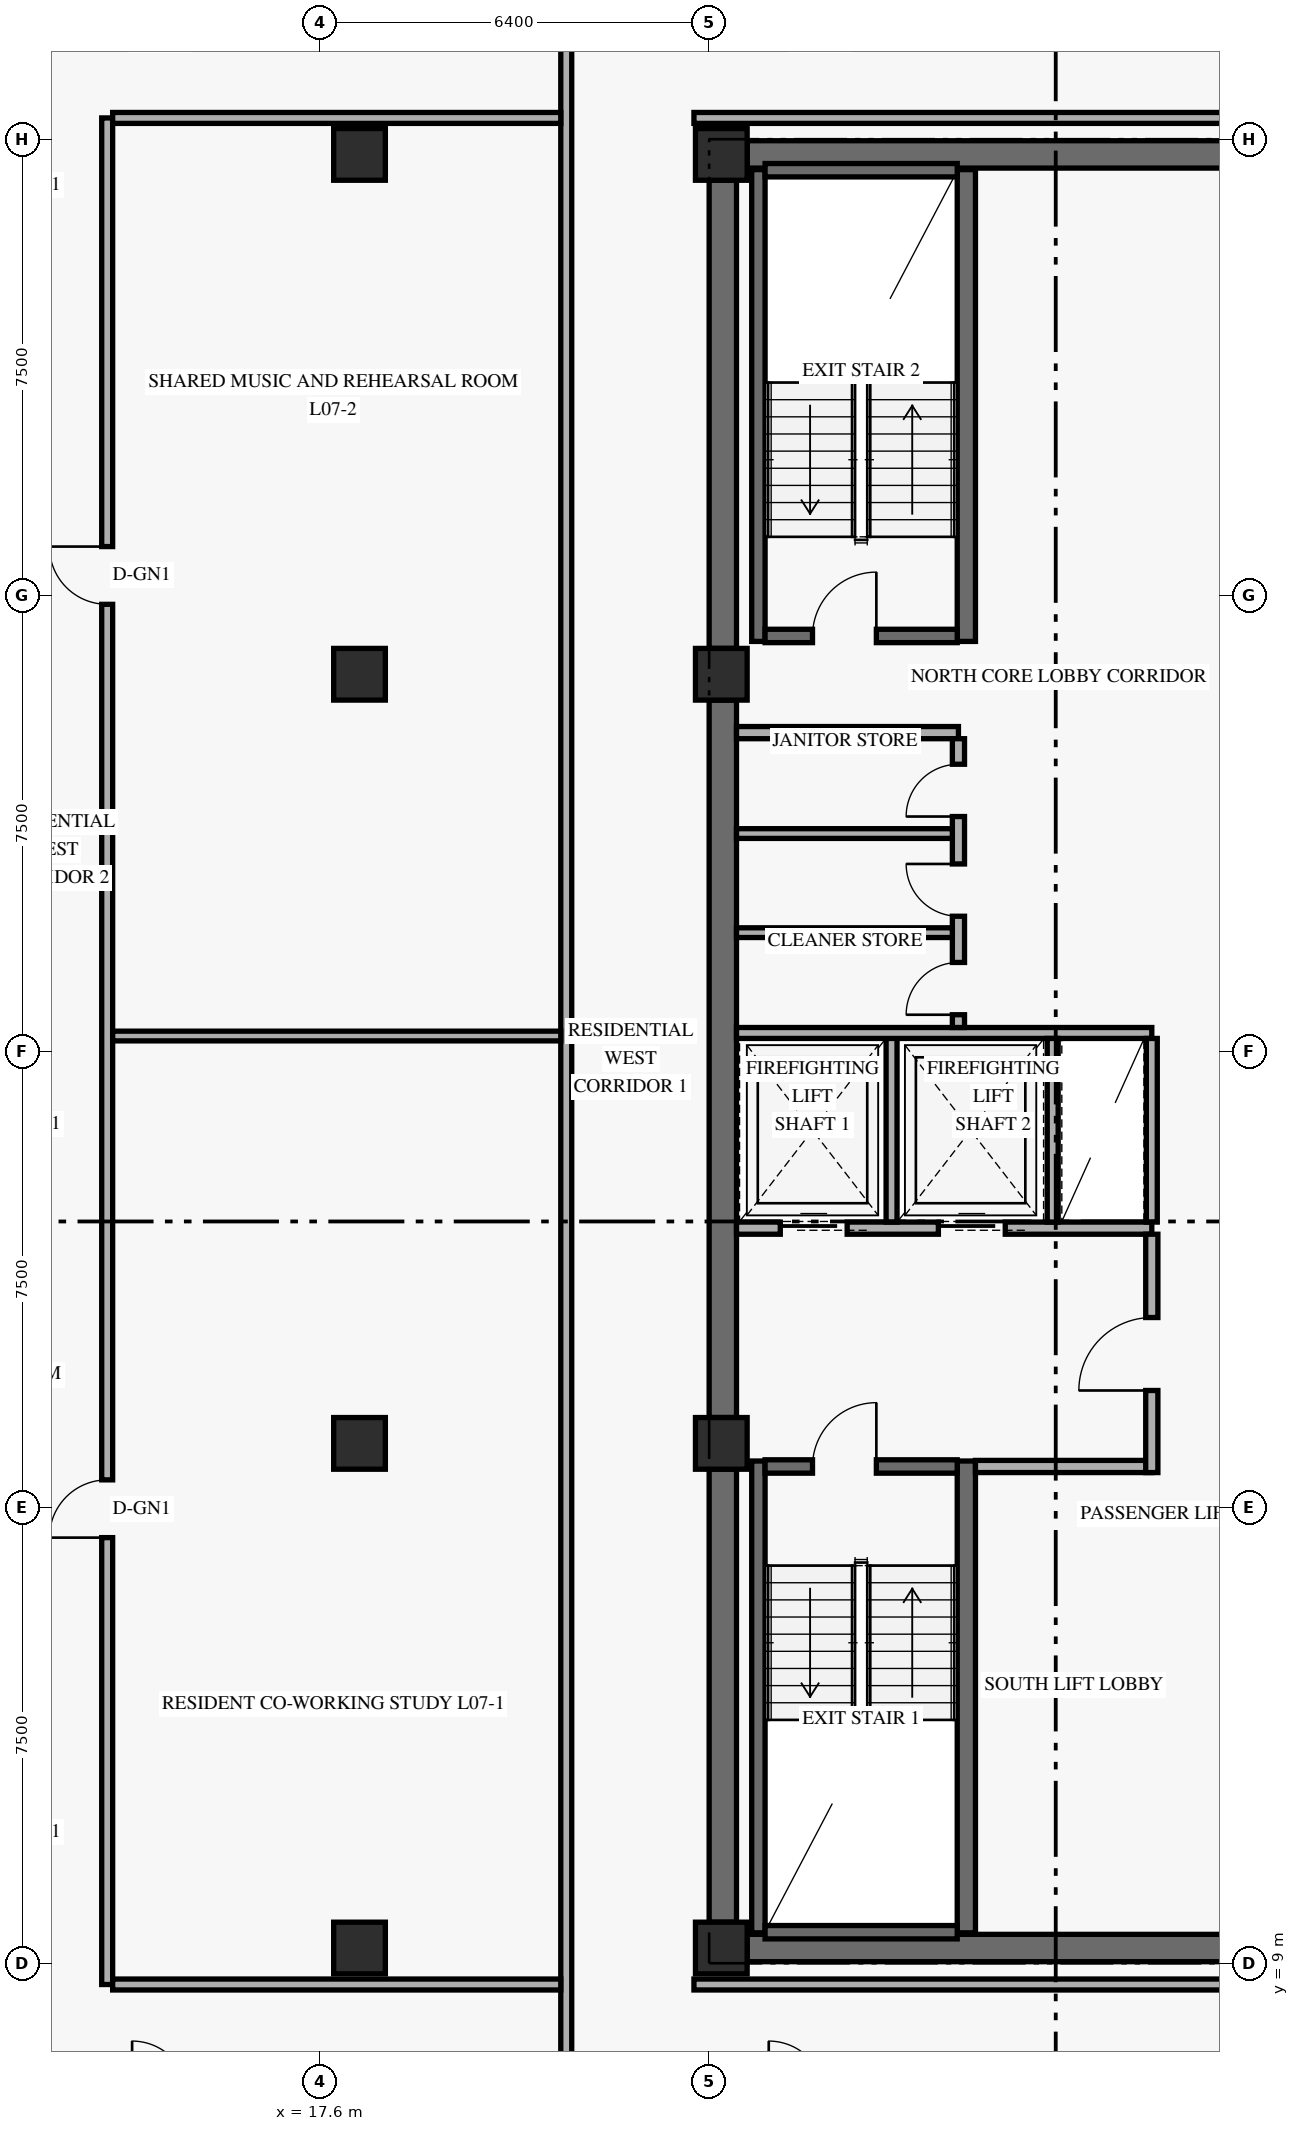
"""IFC4 building model, lengths in metres.
Left out: names, types, materials, properties, quantities, classifications, styles, units other than length and angle.
Written with IfcOpenShell. Run it as: python <this file> out.ifc"""

import sys

from ifc_helpers import new_model, si_unit, direction, frame, frame_2d, origin, origin_2d, place, context, subcontext, project, spatial, rectangle, extrude, element, fill, save


model = new_model("IFC4")
c1 = context("Model", 3, precision=1e-05, world=origin(), true_north=direction((0.0, 1.0)))
c2 = subcontext(c1, "Body", "Model", "MODEL_VIEW")
j1 = project(units=[si_unit("LENGTHUNIT", "METRE"), si_unit("PLANEANGLEUNIT", "RADIAN")], contexts=[c1])
p1 = place(None, origin())
s1 = spatial("IfcSite", under=j1, at=p1, CompositionType="ELEMENT")
p2 = place(p1, origin())
s2 = spatial("IfcBuilding", under=s1, at=p2, CompositionType="ELEMENT")
p3 = place(p2, frame((0.0, 0.0, 31.2)))
s3 = spatial("IfcBuildingStorey", under=s2, at=p3, CompositionType="ELEMENT", Elevation=31.2)
p4 = place(p3, frame((24.225, 9.675, 0.0), z_axis=(0.0, 0.0, 1.0), x_axis=(0.0, 1.0, 0.0)))
e1 = element("IfcWall", 1, at=p4, inside=s3, PredefinedType="SHEAR", context=c2, shape_type="SweptSolid", body=[
    extrude(rectangle(XDim=7.45, YDim=0.45, at=frame_2d((3.725, 0.0))), origin(), (0.0, 0.0, 1.0), 2.667),
])
p5 = place(p3, frame((24.225, 17.975, 0.0), z_axis=(0.0, 0.0, 1.0), x_axis=(0.0, 1.0, 0.0)))
e2 = element("IfcWall", 2, at=p5, inside=s3, PredefinedType="SHEAR", context=c2, shape_type="SweptSolid", body=[
    extrude(rectangle(XDim=11.8, YDim=0.45, at=frame_2d((5.9, 0.0))), origin(), (0.0, 0.0, 1.0), 2.667),
])
p6 = place(p3, frame((24.225, 30.625, 0.0), z_axis=(0.0, 0.0, 1.0), x_axis=(0.0, 1.0, 0.0)))
e3 = element("IfcWall", 3, at=p6, inside=s3, PredefinedType="SHEAR", context=c2, shape_type="SweptSolid", body=[
    extrude(rectangle(XDim=7.7, YDim=0.45, at=frame_2d((3.85, 0.0))), origin(), (0.0, 0.0, 1.0), 2.667),
])
for number, where, z_axis, x_axis in (
    (4, (24.625, 9.25, 0.0), (0.0, 0.0, 1.0), (1.0, 0.0, 0.0)),
    (5, (24.625, 38.75, 0.0), (0.0, 0.0, 1.0), (1.0, 0.0, 0.0)),
):
    element("IfcWall", number, at=place(p3, frame(where, z_axis=z_axis, x_axis=x_axis)), inside=s3, PredefinedType="SHEAR", context=c2, shape_type="SweptSolid", body=[
        extrude(rectangle(XDim=10.15, YDim=0.45, at=frame_2d((5.075, 0.0))), origin(), (0.0, 0.0, 1.0), 3.36),
    ])
p7 = place(p3, frame((24.81, 9.5, 0.0), z_axis=(0.0, 0.0, 1.0), x_axis=(0.0, 1.0, 0.0)))
e6 = element("IfcWall", 6, at=p7, inside=s3, PredefinedType="SHEAR", context=c2, shape_type="SweptSolid", body=[
    extrude(rectangle(XDim=7.76, YDim=0.22, at=frame_2d((3.88, 0.0))), origin(), (0.0, 0.0, 1.0), 3.36),
])
p8 = place(p3, frame((28.23, 9.5, 0.0), z_axis=(0.0, 0.0, 1.0), x_axis=(0.0, 1.0, 0.0)))
e7 = element("IfcWall", 7, at=p8, inside=s3, PredefinedType="SHEAR", context=c2, shape_type="SweptSolid", body=[
    extrude(rectangle(XDim=7.76, YDim=0.3, at=frame_2d((3.88, 0.0))), origin(), (0.0, 0.0, 1.0), 3.36),
])
p9 = place(p3, frame((24.92, 9.51, 0.0), z_axis=(0.0, 0.0, 1.0), x_axis=(1.0, 0.0, 0.0)))
e8 = element("IfcWall", 8, at=p9, inside=s3, PredefinedType="SHEAR", context=c2, shape_type="SweptSolid", body=[
    extrude(rectangle(XDim=3.16, YDim=0.22, at=frame_2d((1.58, 0.0))), origin(), (0.0, 0.0, 1.0), 3.36),
])
p10 = place(p3, frame((24.92, 17.17, 0.0), z_axis=(0.0, 0.0, 1.0), x_axis=(1.0, 0.0, 0.0)))
e9 = element("IfcWall", 9, at=p10, inside=s3, PredefinedType="SHEAR", context=c2, shape_type="SweptSolid", body=[
    extrude(rectangle(XDim=3.16, YDim=0.22, at=frame_2d((1.58, 0.0))), origin(), (0.0, 0.0, 1.0), 3.36),
])
p11 = place(p10, frame((0.78, 0.0, 0.0)))
e10 = element("IfcOpeningElement", 10, at=p11, cuts=e9, PredefinedType="OPENING", context=c2, shape_type="SweptSolid", body=[
    extrude(rectangle(XDim=1.05, YDim=2.15, at=frame_2d((0.525, 1.075))), frame((0.0, 0.12, 0.0), z_axis=(0.0, -1.0, 0.0), x_axis=(1.0, 0.0, 0.0)), (0.0, 0.0, 1.0), 0.24),
])
p12 = place(p3, frame((24.81, 30.74, 0.0), z_axis=(0.0, 0.0, 1.0), x_axis=(0.0, 1.0, 0.0)))
e11 = element("IfcWall", 11, at=p12, inside=s3, PredefinedType="SHEAR", context=c2, shape_type="SweptSolid", body=[
    extrude(rectangle(XDim=7.76, YDim=0.22, at=frame_2d((3.88, 0.0))), origin(), (0.0, 0.0, 1.0), 3.36),
])
p13 = place(p3, frame((28.23, 30.74, 0.0), z_axis=(0.0, 0.0, 1.0), x_axis=(0.0, 1.0, 0.0)))
e12 = element("IfcWall", 12, at=p13, inside=s3, PredefinedType="SHEAR", context=c2, shape_type="SweptSolid", body=[
    extrude(rectangle(XDim=7.76, YDim=0.3, at=frame_2d((3.88, 0.0))), origin(), (0.0, 0.0, 1.0), 3.36),
])
p14 = place(p3, frame((24.92, 30.83, 0.0), z_axis=(0.0, 0.0, 1.0), x_axis=(1.0, 0.0, 0.0)))
e13 = element("IfcWall", 13, at=p14, inside=s3, PredefinedType="SHEAR", context=c2, shape_type="SweptSolid", body=[
    extrude(rectangle(XDim=3.16, YDim=0.22, at=frame_2d((1.58, 0.0))), origin(), (0.0, 0.0, 1.0), 3.36),
])
p15 = place(p14, frame((0.78, 0.0, 0.0)))
e14 = element("IfcOpeningElement", 14, at=p15, cuts=e13, PredefinedType="OPENING", context=c2, shape_type="SweptSolid", body=[
    extrude(rectangle(XDim=1.05, YDim=2.15, at=frame_2d((0.525, 1.075))), frame((0.0, 0.12, 0.0), z_axis=(0.0, -1.0, 0.0), x_axis=(1.0, 0.0, 0.0)), (0.0, 0.0, 1.0), 0.24),
])
p16 = place(p3, frame((24.92, 38.49, 0.0), z_axis=(0.0, 0.0, 1.0), x_axis=(1.0, 0.0, 0.0)))
e15 = element("IfcWall", 15, at=p16, inside=s3, PredefinedType="SHEAR", context=c2, shape_type="SweptSolid", body=[
    extrude(rectangle(XDim=3.16, YDim=0.22, at=frame_2d((1.58, 0.0))), origin(), (0.0, 0.0, 1.0), 3.36),
])
for number, where, z_axis, x_axis in (
    (16, (18.25, 9.25, 0.0), (0.0, 0.0, 1.0), (1.0, 0.0, 0.0)),
    (17, (18.25, 17.55, 0.0), (0.0, 0.0, 1.0), (1.0, 0.0, 0.0)),
    (18, (18.25, 30.2, 0.0), (0.0, 0.0, 1.0), (1.0, 0.0, 0.0)),
    (19, (18.25, 38.75, 0.0), (0.0, 0.0, 1.0), (1.0, 0.0, 0.0)),
    (20, (24.2, 9.25, 0.0), (0.0, 0.0, 1.0), (1.0, 0.0, 0.0)),
    (21, (24.2, 17.55, 0.0), (0.0, 0.0, 1.0), (1.0, 0.0, 0.0)),
    (22, (24.2, 30.2, 0.0), (0.0, 0.0, 1.0), (1.0, 0.0, 0.0)),
    (23, (24.2, 38.75, 0.0), (0.0, 0.0, 1.0), (1.0, 0.0, 0.0)),
):
    element("IfcColumn", number, at=place(p3, frame(where, z_axis=z_axis, x_axis=x_axis)), inside=s3, PredefinedType="COLUMN", context=c2, shape_type="SweptSolid", body=[
        extrude(rectangle(XDim=0.85, YDim=0.85, at=origin_2d()), origin(), (0.0, 0.0, 1.0), 3.6),
    ])
p17 = place(p3, frame((24.45, 21.09, 0.0), z_axis=(0.0, 0.0, 1.0), x_axis=(1.0, 0.0, 0.0)))
e24 = element("IfcWall", 24, at=p17, inside=s3, PredefinedType="STANDARD", context=c2, shape_type="SweptSolid", body=[
    extrude(rectangle(XDim=6.83, YDim=0.2, at=frame_2d((3.415, 0.0))), origin(), (0.0, 0.0, 1.0), 3.36),
])
p18 = place(p17, frame((0.72, 0.0, 0.0)))
e25 = element("IfcOpeningElement", 25, at=p18, cuts=e24, PredefinedType="OPENING", context=c2, shape_type="SweptSolid", body=[
    extrude(rectangle(XDim=1.1, YDim=2.2, at=frame_2d((0.55, 1.1))), frame((0.0, 0.11, 0.0), z_axis=(0.0, -1.0, 0.0), x_axis=(1.0, 0.0, 0.0)), (0.0, 0.0, 1.0), 0.22),
])
p19 = place(p17, frame((3.32, 0.0, 0.0)))
e26 = element("IfcOpeningElement", 26, at=p19, cuts=e24, PredefinedType="OPENING", context=c2, shape_type="SweptSolid", body=[
    extrude(rectangle(XDim=1.1, YDim=2.2, at=frame_2d((0.55, 1.1))), frame((0.0, 0.11, 0.0), z_axis=(0.0, -1.0, 0.0), x_axis=(1.0, 0.0, 0.0)), (0.0, 0.0, 1.0), 0.22),
])
p20 = place(p3, frame((28.38, 17.17, 0.0), z_axis=(0.0, 0.0, 1.0), x_axis=(1.0, 0.0, 0.0)))
e27 = element("IfcWall", 27, at=p20, inside=s3, PredefinedType="STANDARD", context=c2, shape_type="SweptSolid", body=[
    extrude(rectangle(XDim=2.9, YDim=0.2, at=frame_2d((1.45, 0.0))), origin(), (0.0, 0.0, 1.0), 3.36),
])
p21 = place(p3, frame((31.28, 17.07, 0.0), z_axis=(0.0, 0.0, 1.0), x_axis=(0.0, 1.0, 0.0)))
e28 = element("IfcWall", 28, at=p21, inside=s3, PredefinedType="STANDARD", context=c2, shape_type="SweptSolid", body=[
    extrude(rectangle(XDim=3.92, YDim=0.2, at=frame_2d((1.96, 0.0))), origin(), (0.0, 0.0, 1.0), 2.649),
])
p22 = place(p21, frame((1.35, 0.0, 0.0)))
e29 = element("IfcOpeningElement", 29, at=p22, cuts=e28, PredefinedType="OPENING", context=c2, shape_type="SweptSolid", body=[
    extrude(rectangle(XDim=1.2, YDim=2.15, at=frame_2d((0.6, 1.075))), frame((0.0, 0.11, 0.0), z_axis=(0.0, -1.0, 0.0), x_axis=(1.0, 0.0, 0.0)), (0.0, 0.0, 1.0), 0.22),
])
p23 = place(p3, frame((27.0, 21.19, 0.0), z_axis=(0.0, 0.0, 1.0), x_axis=(0.0, 1.0, 0.0)))
e30 = element("IfcWall", 30, at=p23, inside=s3, PredefinedType="STANDARD", context=c2, shape_type="SweptSolid", body=[
    extrude(rectangle(XDim=3.11, YDim=0.18, at=frame_2d((1.555, 0.0))), origin(), (0.0, 0.0, 1.0), 3.36),
])
p24 = place(p3, frame((24.45, 24.3, 0.0), z_axis=(0.0, 0.0, 1.0), x_axis=(1.0, 0.0, 0.0)))
e31 = element("IfcWall", 31, at=p24, inside=s3, PredefinedType="STANDARD", context=c2, shape_type="SweptSolid", body=[
    extrude(rectangle(XDim=6.83, YDim=0.18, at=frame_2d((3.415, 0.0))), origin(), (0.0, 0.0, 1.0), 3.36),
])
for number, where, z_axis, x_axis in (
    (32, (29.65, 21.19, 0.0), (0.0, 0.0, 1.0), (0.0, 1.0, 0.0)),
    (33, (31.28, 21.19, 0.0), (0.0, 0.0, 1.0), (0.0, 1.0, 0.0)),
):
    element("IfcWall", number, at=place(p3, frame(where, z_axis=z_axis, x_axis=x_axis)), inside=s3, PredefinedType="STANDARD", context=c2, shape_type="SweptSolid", body=[
        extrude(rectangle(XDim=3.02, YDim=0.18, at=frame_2d((1.51, 0.0))), origin(), (0.0, 0.0, 1.0), 3.36),
    ])
p25 = place(p3, frame((24.45, 29.24, 0.0), z_axis=(0.0, 0.0, 1.0), x_axis=(1.0, 0.0, 0.0)))
e34 = element("IfcWall", 34, at=p25, inside=s3, PredefinedType="STANDARD", context=c2, shape_type="SweptSolid", body=[
    extrude(rectangle(XDim=3.65, YDim=0.2, at=frame_2d((1.825, 0.0))), origin(), (0.0, 0.0, 1.0), 3.36),
])
p26 = place(p3, frame((28.1, 24.39, 0.0), z_axis=(0.0, 0.0, 1.0), x_axis=(0.0, 1.0, 0.0)))
e35 = element("IfcWall", 35, at=p26, inside=s3, PredefinedType="STANDARD", context=c2, shape_type="SweptSolid", body=[
    extrude(rectangle(XDim=4.75, YDim=0.2, at=frame_2d((2.375, 0.0))), origin(), (0.0, 0.0, 1.0), 3.36),
])
p27 = place(p26, frame((0.21, 0.0, 0.0)))
e36 = element("IfcOpeningElement", 36, at=p27, cuts=e35, PredefinedType="OPENING", context=c2, shape_type="SweptSolid", body=[
    extrude(rectangle(XDim=0.86, YDim=2.1, at=frame_2d((0.43, 1.05))), frame((0.0, 0.11, 0.0), z_axis=(0.0, -1.0, 0.0), x_axis=(1.0, 0.0, 0.0)), (0.0, 0.0, 1.0), 0.22),
])
p28 = place(p26, frame((1.83, 0.0, 0.0)))
e37 = element("IfcOpeningElement", 37, at=p28, cuts=e35, PredefinedType="OPENING", context=c2, shape_type="SweptSolid", body=[
    extrude(rectangle(XDim=0.86, YDim=2.1, at=frame_2d((0.43, 1.05))), frame((0.0, 0.11, 0.0), z_axis=(0.0, -1.0, 0.0), x_axis=(1.0, 0.0, 0.0)), (0.0, 0.0, 1.0), 0.22),
])
p29 = place(p26, frame((3.47, 0.0, 0.0)))
e38 = element("IfcOpeningElement", 38, at=p29, cuts=e35, PredefinedType="OPENING", context=c2, shape_type="SweptSolid", body=[
    extrude(rectangle(XDim=0.86, YDim=2.1, at=frame_2d((0.43, 1.05))), frame((0.0, 0.11, 0.0), z_axis=(0.0, -1.0, 0.0), x_axis=(1.0, 0.0, 0.0)), (0.0, 0.0, 1.0), 0.22),
])
for number, where, z_axis, x_axis in (
    (39, (24.45, 25.95, 0.0), (0.0, 0.0, 1.0), (1.0, 0.0, 0.0)),
    (40, (24.45, 27.58, 0.0), (0.0, 0.0, 1.0), (1.0, 0.0, 0.0)),
):
    element("IfcWall", number, at=place(p3, frame(where, z_axis=z_axis, x_axis=x_axis)), inside=s3, PredefinedType="PARTITIONING", context=c2, shape_type="SweptSolid", body=[
        extrude(rectangle(XDim=3.55, YDim=0.16, at=frame_2d((1.775, 0.0))), origin(), (0.0, 0.0, 1.0), 3.36),
    ])
p30 = place(p3, frame((21.65, 6.8, 0.0), z_axis=(0.0, 0.0, 1.0), x_axis=(0.0, 1.0, 0.0)))
e41 = element("IfcWall", 41, at=p30, inside=s3, PredefinedType="STANDARD", context=c2, shape_type="SweptSolid", body=[
    extrude(rectangle(XDim=34.4, YDim=0.18, at=frame_2d((17.2, 0.0))), origin(), (0.0, 0.0, 1.0), 2.649),
])
for number, where, z_axis, x_axis in (
    (42, (23.75, 8.65, 0.0), (0.0, 0.0, 1.0), (1.0, 0.0, 0.0)),
    (43, (23.75, 39.35, 0.0), (0.0, 0.0, 1.0), (1.0, 0.0, 0.0)),
):
    element("IfcWall", number, at=place(p3, frame(where, z_axis=z_axis, x_axis=x_axis)), inside=s3, PredefinedType="STANDARD", context=c2, shape_type="SweptSolid", body=[
        extrude(rectangle(XDim=11.67, YDim=0.18, at=frame_2d((5.835, 0.0))), origin(), (0.0, 0.0, 1.0), 2.649),
    ])
p31 = place(p3, frame((14.1, 8.65, 0.0), z_axis=(0.0, 0.0, 1.0), x_axis=(0.0, 1.0, 0.0)))
e44 = element("IfcWall", 44, at=p31, inside=s3, PredefinedType="STANDARD", context=c2, shape_type="SweptSolid", body=[
    extrude(rectangle(XDim=30.7, YDim=0.18, at=frame_2d((15.35, 0.0))), origin(), (0.0, 0.0, 1.0), 2.649),
])
p32 = place(p31, frame((7.35, 0.0, 0.0)))
e45 = element("IfcOpeningElement", 45, at=p32, cuts=e44, PredefinedType="OPENING", context=c2, shape_type="SweptSolid", body=[
    extrude(rectangle(XDim=0.95, YDim=2.15, at=frame_2d((0.475, 1.075))), frame((0.0, 0.1, 0.0), z_axis=(0.0, -1.0, 0.0), x_axis=(1.0, 0.0, 0.0)), (0.0, 0.0, 1.0), 0.2),
])
p33 = place(p31, frame((22.7, 0.0, 0.0)))
e46 = element("IfcOpeningElement", 46, at=p33, cuts=e44, PredefinedType="OPENING", context=c2, shape_type="SweptSolid", body=[
    extrude(rectangle(XDim=0.95, YDim=2.15, at=frame_2d((0.475, 1.075))), frame((0.0, 0.1, 0.0), z_axis=(0.0, -1.0, 0.0), x_axis=(1.0, 0.0, 0.0)), (0.0, 0.0, 1.0), 0.2),
])
for number, where, z_axis, x_axis in (
    (47, (14.19, 8.65, 0.0), (0.0, 0.0, 1.0), (1.0, 0.0, 0.0)),
    (48, (14.19, 39.35, 0.0), (0.0, 0.0, 1.0), (1.0, 0.0, 0.0)),
):
    element("IfcWall", number, at=place(p3, frame(where, z_axis=z_axis, x_axis=x_axis)), inside=s3, PredefinedType="STANDARD", context=c2, shape_type="SweptSolid", body=[
        extrude(rectangle(XDim=7.37, YDim=0.18, at=frame_2d((3.685, 0.0))), origin(), (0.0, 0.0, 1.0), 2.649),
    ])
p34 = place(p3, frame((14.19, 24.25, 0.0), z_axis=(0.0, 0.0, 1.0), x_axis=(1.0, 0.0, 0.0)))
e49 = element("IfcWall", 49, at=p34, inside=s3, PredefinedType="PARTITIONING", context=c2, shape_type="SweptSolid", body=[
    extrude(rectangle(XDim=7.37, YDim=0.16, at=frame_2d((3.685, 0.0))), origin(), (0.0, 0.0, 1.0), 2.649),
])
p35 = place(p11, frame((1.05, 0.0, 0.0), z_axis=(0.0, 0.0, 1.0), x_axis=(-1.0, 0.0, 0.0)))
e50 = element("IfcDoor", 50, at=p35, inside=s3, OperationType="SINGLE_SWING_LEFT", PredefinedType="DOOR", context=c2, shape_type="SweptSolid", body=[
    extrude(rectangle(XDim=1.05, YDim=2.15, at=frame_2d((0.525, 1.075))), frame((0.0, 0.025, 0.0), z_axis=(0.0, -1.0, 0.0), x_axis=(1.0, 0.0, 0.0)), (0.0, 0.0, 1.0), 0.05),
])
fill(e10, e50)
p36 = place(p15, origin())
e51 = element("IfcDoor", 51, at=p36, inside=s3, OperationType="SINGLE_SWING_RIGHT", PredefinedType="DOOR", context=c2, shape_type="SweptSolid", body=[
    extrude(rectangle(XDim=1.05, YDim=2.15, at=frame_2d((0.525, 1.075))), frame((0.0, 0.025, 0.0), z_axis=(0.0, -1.0, 0.0), x_axis=(1.0, 0.0, 0.0)), (0.0, 0.0, 1.0), 0.05),
])
fill(e14, e51)
p37 = place(p18, origin())
e52 = element("IfcDoor", 52, at=p37, inside=s3, OperationType="SLIDING_TO_LEFT", PredefinedType="DOOR", context=c2, shape_type="SweptSolid", body=[
    extrude(rectangle(XDim=1.1, YDim=2.2, at=frame_2d((0.55, 1.1))), frame((0.0, 0.025, 0.0), z_axis=(0.0, -1.0, 0.0), x_axis=(1.0, 0.0, 0.0)), (0.0, 0.0, 1.0), 0.05),
])
fill(e25, e52)
p38 = place(p19, origin())
e53 = element("IfcDoor", 53, at=p38, inside=s3, OperationType="SLIDING_TO_LEFT", PredefinedType="DOOR", context=c2, shape_type="SweptSolid", body=[
    extrude(rectangle(XDim=1.1, YDim=2.2, at=frame_2d((0.55, 1.1))), frame((0.0, 0.025, 0.0), z_axis=(0.0, -1.0, 0.0), x_axis=(1.0, 0.0, 0.0)), (0.0, 0.0, 1.0), 0.05),
])
fill(e26, e53)
p39 = place(p22, origin())
e54 = element("IfcDoor", 54, at=p39, inside=s3, OperationType="SINGLE_SWING_LEFT", PredefinedType="DOOR", context=c2, shape_type="SweptSolid", body=[
    extrude(rectangle(XDim=1.2, YDim=2.15, at=frame_2d((0.6, 1.075))), frame((0.0, 0.025, 0.0), z_axis=(0.0, -1.0, 0.0), x_axis=(1.0, 0.0, 0.0)), (0.0, 0.0, 1.0), 0.05),
])
fill(e29, e54)
p40 = place(p27, origin())
e55 = element("IfcDoor", 55, at=p40, inside=s3, OperationType="SINGLE_SWING_LEFT", PredefinedType="DOOR", context=c2, shape_type="SweptSolid", body=[
    extrude(rectangle(XDim=0.86, YDim=2.1, at=frame_2d((0.43, 1.05))), frame((0.0, 0.025, 0.0), z_axis=(0.0, -1.0, 0.0), x_axis=(1.0, 0.0, 0.0)), (0.0, 0.0, 1.0), 0.05),
])
fill(e36, e55)
p41 = place(p28, origin())
e56 = element("IfcDoor", 56, at=p41, inside=s3, OperationType="SINGLE_SWING_RIGHT", PredefinedType="DOOR", context=c2, shape_type="SweptSolid", body=[
    extrude(rectangle(XDim=0.86, YDim=2.1, at=frame_2d((0.43, 1.05))), frame((0.0, 0.025, 0.0), z_axis=(0.0, -1.0, 0.0), x_axis=(1.0, 0.0, 0.0)), (0.0, 0.0, 1.0), 0.05),
])
fill(e37, e56)
p42 = place(p29, origin())
e57 = element("IfcDoor", 57, at=p42, inside=s3, OperationType="SINGLE_SWING_LEFT", PredefinedType="DOOR", context=c2, shape_type="SweptSolid", body=[
    extrude(rectangle(XDim=0.86, YDim=2.1, at=frame_2d((0.43, 1.05))), frame((0.0, 0.025, 0.0), z_axis=(0.0, -1.0, 0.0), x_axis=(1.0, 0.0, 0.0)), (0.0, 0.0, 1.0), 0.05),
])
fill(e38, e57)
p43 = place(p32, origin())
e58 = element("IfcDoor", 58, at=p43, inside=s3, OperationType="SINGLE_SWING_LEFT", PredefinedType="DOOR", context=c2, shape_type="SweptSolid", body=[
    extrude(rectangle(XDim=0.95, YDim=2.15, at=frame_2d((0.475, 1.075))), frame((0.0, 0.025, 0.0), z_axis=(0.0, -1.0, 0.0), x_axis=(1.0, 0.0, 0.0)), (0.0, 0.0, 1.0), 0.05),
])
fill(e45, e58)
p44 = place(p33, origin())
e59 = element("IfcDoor", 59, at=p44, inside=s3, OperationType="SINGLE_SWING_RIGHT", PredefinedType="DOOR", context=c2, shape_type="SweptSolid", body=[
    extrude(rectangle(XDim=0.95, YDim=2.15, at=frame_2d((0.475, 1.075))), frame((0.0, 0.025, 0.0), z_axis=(0.0, -1.0, 0.0), x_axis=(1.0, 0.0, 0.0)), (0.0, 0.0, 1.0), 0.05),
])
fill(e46, e59)
save(model, sys.argv[1])
